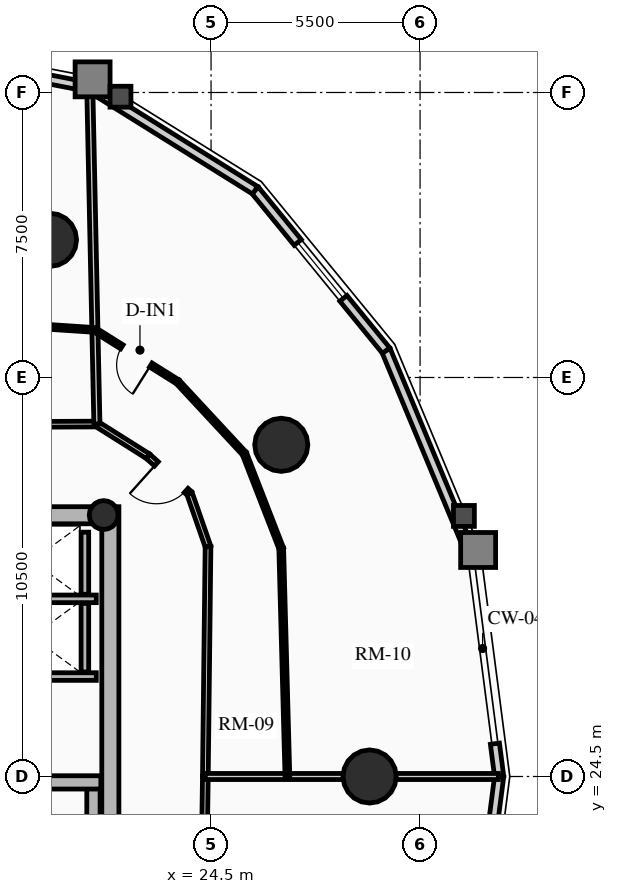
"""IFC4 building model, lengths in metres.
Left out: names, types, materials, properties, quantities, classifications, styles, units other than length and angle.
Written with IfcOpenShell. Run it as: python <this file> out.ifc"""

import sys

from ifc_helpers import new_model, si_unit, direction, frame, frame_2d, origin, origin_2d, place, context, subcontext, project, spatial, rectangle, circle, hollow_circle, extrude, source, transform, mapped, element, fill, save


model = new_model("IFC4")
c1 = context("Model", 3, precision=1e-05, world=origin(), true_north=direction((0.0, 1.0)))
c2 = subcontext(c1, "Body", "Model", "MODEL_VIEW")
j1 = project(units=[si_unit("LENGTHUNIT", "METRE"), si_unit("PLANEANGLEUNIT", "RADIAN")], contexts=[c1])
p1 = place(None, origin())
s1 = spatial("IfcSite", under=j1, at=p1, CompositionType="ELEMENT")
p2 = place(p1, origin())
s2 = spatial("IfcBuilding", under=s1, at=p2, CompositionType="ELEMENT")
p3 = place(p2, frame((0.0, 0.0, 93.43)))
s3 = spatial("IfcBuildingStorey", under=s2, at=p3, CompositionType="ELEMENT", Elevation=93.43)
p4 = place(p3, frame((21.85, 17.4, 0.0), z_axis=(0.0, 0.0, 1.0), x_axis=(0.0, 1.0, 0.0)))
e1 = element("IfcWall", 1, at=p4, inside=s3, PredefinedType="SHEAR", context=c2, shape_type="SweptSolid", body=[
    extrude(rectangle(XDim=14.2, YDim=0.45, at=frame_2d((7.1, 0.0))), origin(), (0.0, 0.0, 1.0), 2.91),
])
p5 = place(p3, frame((11.15, 31.375, 0.0), z_axis=(0.0, 0.0, 1.0), x_axis=(1.0, 0.0, 0.0)))
e2 = element("IfcWall", 2, at=p5, inside=s3, PredefinedType="SHEAR", context=c2, shape_type="SweptSolid", body=[
    extrude(rectangle(XDim=10.7, YDim=0.45, at=frame_2d((5.35, 0.0))), origin(), (0.0, 0.0, 1.0), 2.91),
])
m1 = source(origin(), c2, "Body", "SweptSolid", [
    extrude(rectangle(XDim=1.5, YDim=2.02, at=frame_2d((0.75, 1.01))), frame((0.0, 0.235, 0.0), z_axis=(0.0, -1.0, 0.0), x_axis=(1.0, 0.0, 0.0)), (0.0, 0.0, 1.0), 0.47),
])
p6 = place(p5, frame((4.6, 0.0, 0.0)))
e3 = element("IfcOpeningElement", 3, at=p6, cuts=e2, PredefinedType="OPENING", context=c2, shape_type="MappedRepresentation", body=[
    mapped(m1, transform((0.0, 0.0, 0.0), x_axis=(1.0, 0.0, 0.0), y_axis=(0.0, 1.0, 0.0), z_axis=(0.0, 0.0, 1.0), scale=1.0)),
])
p7 = place(p3, frame((21.405, 17.625, 0.0), z_axis=(0.0, 0.0, 1.0), x_axis=(0.0, 1.0, 0.0)))
e4 = element("IfcWall", 4, at=p7, inside=s3, PredefinedType="SHEAR", context=c2, shape_type="SweptSolid", body=[
    extrude(rectangle(XDim=6.72, YDim=0.35, at=frame_2d((3.36, 0.0))), origin(), (0.0, 0.0, 1.0), 2.91),
])
p8 = place(p3, frame((18.315, 24.345, 0.0), z_axis=(0.0, 0.0, 1.0), x_axis=(1.0, 0.0, 0.0)))
e5 = element("IfcWall", 5, at=p8, inside=s3, PredefinedType="SHEAR", context=c2, shape_type="SweptSolid", body=[
    extrude(rectangle(XDim=3.285, YDim=0.35, at=frame_2d((1.643, 0.0))), origin(), (0.0, 0.0, 1.0), 2.91),
])
p9 = place(p3, frame((21.675, 31.38, 0.0), z_axis=(0.0, 0.0, 1.0), x_axis=(1.0, 0.0, 0.0)))
e6 = element("IfcColumn", 6, at=p9, inside=s3, PredefinedType="COLUMN", context=c2, shape_type="SweptSolid", body=[
    extrude(hollow_circle(Radius=0.38, WallThickness=0.032, at=origin_2d()), origin(), (0.0, 0.0, 1.0), 2.91),
])
for number, where, z_axis, x_axis in (
    (7, (28.672, 24.5, 0.0), (0.0, 0.0, 1.0), (1.0, 0.0, 0.0)),
    (8, (26.347, 33.229, 0.0), (0.0, 0.0, 1.0), (1.0, 0.0, 0.0)),
    (9, (20.261, 38.623, 0.0), (0.0, 0.0, 1.0), (1.0, 0.0, 0.0)),
):
    element("IfcColumn", number, at=place(p3, frame(where, z_axis=z_axis, x_axis=x_axis)), inside=s3, PredefinedType="USERDEFINED", context=c2, shape_type="SweptSolid", body=[
        extrude(circle(Radius=0.7, at=origin_2d()), origin(), (0.0, 0.0, 1.0), 2.91),
    ])
p10 = place(p3, frame((31.969, 25.363, 0.0), z_axis=(0.0, 0.0, 1.0), x_axis=(0.128523364007, -0.991706481225, 0.0)))
e10 = element("IfcWall", 10, at=p10, inside=s3, PredefinedType="SOLIDWALL", context=c2, shape_type="SweptSolid", body=[
    extrude(rectangle(XDim=0.87, YDim=0.24, at=frame_2d((0.435, 0.0))), origin(), (0.0, 0.0, 1.0), 2.655),
])
p11 = place(p3, frame((29.105, 35.709, 0.0), z_axis=(0.0, 0.0, 1.0), x_axis=(0.384344417632, -0.923189779317, 0.0)))
e11 = element("IfcWall", 11, at=p11, inside=s3, PredefinedType="SOLIDWALL", context=c2, shape_type="SweptSolid", body=[
    extrude(rectangle(XDim=5.758, YDim=0.24, at=frame_2d((2.879, 0.0))), origin(), (0.0, 0.0, 1.0), 2.179),
])
p12 = place(p3, frame((25.658, 39.928, 0.0), z_axis=(0.0, 0.0, 1.0), x_axis=(0.632700781152, -0.77439635945, 0.0)))
e12 = element("IfcWall", 12, at=p12, inside=s3, PredefinedType="SOLIDWALL", context=c2, shape_type="SweptSolid", body=[
    extrude(rectangle(XDim=5.448, YDim=0.24, at=frame_2d((2.724, 0.0))), origin(), (0.0, 0.0, 1.0), 2.179),
])
m2 = source(origin(), c2, "Body", "SweptSolid", [
    extrude(rectangle(XDim=1.9, YDim=1.35, at=frame_2d((0.95, 0.675))), frame((0.0, 0.13, 0.0), z_axis=(0.0, -1.0, 0.0), x_axis=(1.0, 0.0, 0.0)), (0.0, 0.0, 1.0), 0.26),
])
p13 = place(p12, frame((1.774, 0.0, 0.65)))
e13 = element("IfcOpeningElement", 13, at=p13, cuts=e12, PredefinedType="OPENING", context=c2, shape_type="MappedRepresentation", body=[
    mapped(m2, transform((0.0, 0.0, 0.0), x_axis=(1.0, 0.0, 0.0), y_axis=(0.0, 1.0, 0.0), z_axis=(0.0, 0.0, 1.0), scale=1.0)),
])
p14 = place(p3, frame((21.315, 42.637, 0.0), z_axis=(0.0, 0.0, 1.0), x_axis=(0.848520380187, -0.529162701263, 0.0)))
e14 = element("IfcWall", 14, at=p14, inside=s3, PredefinedType="SOLIDWALL", context=c2, shape_type="SweptSolid", body=[
    extrude(rectangle(XDim=5.119, YDim=0.24, at=frame_2d((2.56, 0.0))), origin(), (0.0, 0.0, 1.0), 2.179),
])
p15 = place(p3, frame((16.5, 43.57, 0.0), z_axis=(0.0, 0.0, 1.0), x_axis=(0.981723785992, -0.190311344954, 0.0)))
e15 = element("IfcWall", 15, at=p15, inside=s3, PredefinedType="SOLIDWALL", context=c2, shape_type="SweptSolid", body=[
    extrude(rectangle(XDim=4.904, YDim=0.24, at=frame_2d((2.452, 0.0))), origin(), (0.0, 0.0, 1.0), 2.179),
])
m3 = source(origin(), c2, "Body", "SweptSolid", [
    extrude(rectangle(XDim=2.2, YDim=1.35, at=frame_2d((1.1, 0.675))), frame((0.0, 0.13, 0.0), z_axis=(0.0, -1.0, 0.0), x_axis=(1.0, 0.0, 0.0)), (0.0, 0.0, 1.0), 0.26),
])
p16 = place(p15, frame((1.352, 0.0, 0.65)))
e16 = element("IfcOpeningElement", 16, at=p16, cuts=e15, PredefinedType="OPENING", context=c2, shape_type="MappedRepresentation", body=[
    mapped(m3, transform((0.0, 0.0, 0.0), x_axis=(1.0, 0.0, 0.0), y_axis=(0.0, 1.0, 0.0), z_axis=(0.0, 0.0, 1.0), scale=1.0)),
])
p17 = place(p3, frame((32.081, 24.5, 0.0), z_axis=(0.0, 0.0, 1.0), x_axis=(-0.128351991996, -0.991728675672, 0.0)))
e17 = element("IfcWall", 17, at=p17, inside=s3, PredefinedType="SOLIDWALL", context=c2, shape_type="SweptSolid", body=[
    extrude(rectangle(XDim=5.942, YDim=0.24, at=frame_2d((2.971, 0.0))), origin(), (0.0, 0.0, 1.0), 2.179),
])
p18 = place(p17, frame((1.871, 0.0, 0.65)))
e18 = element("IfcOpeningElement", 18, at=p18, cuts=e17, PredefinedType="OPENING", context=c2, shape_type="MappedRepresentation", body=[
    mapped(m3, transform((0.0, 0.0, 0.0), x_axis=(1.0, 0.0, 0.0), y_axis=(0.0, 1.0, 0.0), z_axis=(0.0, 0.0, 1.0), scale=1.0)),
])
for number, where, z_axis, x_axis in (
    (19, (18.51, 27.13, 0.0), (0.0, 0.0, 1.0), (1.0, 0.0, 0.0)),
    (20, (18.51, 29.175, 0.0), (0.0, 0.0, 1.0), (1.0, 0.0, 0.0)),
):
    element("IfcWall", number, at=place(p3, frame(where, z_axis=z_axis, x_axis=x_axis)), inside=s3, PredefinedType="SHEAR", context=c2, shape_type="SweptSolid", body=[
        extrude(rectangle(XDim=2.97, YDim=0.2, at=frame_2d((1.485, 0.0))), origin(), (0.0, 0.0, 1.0), 2.91),
    ])
p19 = place(p3, frame((21.18, 27.25, 0.0), z_axis=(0.0, 0.0, 1.0), x_axis=(0.0, 1.0, 0.0)))
e21 = element("IfcWall", 21, at=p19, inside=s3, PredefinedType="SHEAR", context=c2, shape_type="SweptSolid", body=[
    extrude(rectangle(XDim=1.805, YDim=0.2, at=frame_2d((0.902, 0.0))), origin(), (0.0, 0.0, 1.0), 2.91),
])
p20 = place(p3, frame((21.18, 29.295, 0.0), z_axis=(0.0, 0.0, 1.0), x_axis=(0.0, 1.0, 0.0)))
e22 = element("IfcWall", 22, at=p20, inside=s3, PredefinedType="SHEAR", context=c2, shape_type="SweptSolid", body=[
    extrude(rectangle(XDim=1.635, YDim=0.2, at=frame_2d((0.817, 0.0))), origin(), (0.0, 0.0, 1.0), 2.91),
])
p21 = place(p3, frame((24.35, 24.5, 0.0), z_axis=(0.0, 0.0, 1.0), x_axis=(0.011582078845, 0.999932925475, 0.0)))
e23 = element("IfcWall", 23, at=p21, inside=s3, PredefinedType="PARTITIONING", context=c2, shape_type="SweptSolid", body=[
    extrude(rectangle(XDim=6.05, YDim=0.15, at=frame_2d((3.025, 0.0))), origin(), (0.0, 0.0, 1.0), 2.225),
])
p22 = place(p3, frame((24.42, 30.549, 0.0), z_axis=(0.0, 0.0, 1.0), x_axis=(-0.329071042252, 0.944305167386, 0.0)))
e24 = element("IfcWall", 24, at=p22, inside=s3, PredefinedType="PARTITIONING", context=c2, shape_type="SweptSolid", body=[
    extrude(rectangle(XDim=1.479, YDim=0.15, at=frame_2d((0.74, 0.0))), origin(), (0.0, 0.0, 1.0), 2.225),
])
p23 = place(p3, frame((23.933, 31.946, 0.0), z_axis=(0.0, 0.0, 1.0), x_axis=(-0.744529651383, 0.667589393423, 0.0)))
e25 = element("IfcWall", 25, at=p23, inside=s3, PredefinedType="PARTITIONING", context=c2, shape_type="SweptSolid", body=[
    extrude(rectangle(XDim=1.472, YDim=0.15, at=frame_2d((0.736, 0.0))), origin(), (0.0, 0.0, 1.0), 2.225),
])
m4 = source(origin(), c2, "Body", "SweptSolid", [
    extrude(rectangle(XDim=1.05, YDim=2.015, at=frame_2d((0.525, 1.007))), frame((0.0, 0.085, 0.0), z_axis=(0.0, -1.0, 0.0), x_axis=(1.0, 0.0, 0.0)), (0.0, 0.0, 1.0), 0.17),
])
p24 = place(p23, frame((0.12, 0.0, 0.0)))
e26 = element("IfcOpeningElement", 26, at=p24, cuts=e25, PredefinedType="OPENING", context=c2, shape_type="MappedRepresentation", body=[
    mapped(m4, transform((0.0, 0.0, 0.0), x_axis=(1.0, 0.0, 0.0), y_axis=(0.0, 1.0, 0.0), z_axis=(0.0, 0.0, 1.0), scale=1.0)),
])
p25 = place(p3, frame((22.837, 32.929, 0.0), z_axis=(0.0, 0.0, 1.0), x_axis=(-0.84581079329, 0.533482991252, 0.0)))
e27 = element("IfcWall", 27, at=p25, inside=s3, PredefinedType="PARTITIONING", context=c2, shape_type="SweptSolid", body=[
    extrude(rectangle(XDim=1.585, YDim=0.15, at=frame_2d((0.792, 0.0))), origin(), (0.0, 0.0, 1.0), 2.225),
])
p26 = place(p3, frame((21.496, 33.775, 0.0), z_axis=(0.0, 0.0, 1.0), x_axis=(-0.999989544737, -0.004572790979, 0.0)))
e28 = element("IfcWall", 28, at=p26, inside=s3, PredefinedType="PARTITIONING", context=c2, shape_type="SweptSolid", body=[
    extrude(rectangle(XDim=3.364, YDim=0.15, at=frame_2d((1.682, 0.0))), origin(), (0.0, 0.0, 1.0), 2.225),
])
p27 = place(p3, frame((24.264, 18.561, 0.0), z_axis=(0.0, 0.0, 1.0), x_axis=(0.014427504204, 0.999895918145, 0.0)))
e29 = element("IfcWall", 29, at=p27, inside=s3, PredefinedType="PARTITIONING", context=c2, shape_type="SweptSolid", body=[
    extrude(rectangle(XDim=5.94, YDim=0.15, at=frame_2d((2.97, 0.0))), origin(), (0.0, 0.0, 1.0), 2.655),
])
m5 = source(origin(), c2, "Body", "SweptSolid", [
    extrude(rectangle(XDim=1.0, YDim=2.015, at=frame_2d((0.5, 1.007))), frame((0.0, 0.085, 0.0), z_axis=(0.0, -1.0, 0.0), x_axis=(1.0, 0.0, 0.0)), (0.0, 0.0, 1.0), 0.17),
])
p28 = place(p27, frame((2.47, 0.0, 0.0)))
e30 = element("IfcOpeningElement", 30, at=p28, cuts=e29, PredefinedType="OPENING", context=c2, shape_type="MappedRepresentation", body=[
    mapped(m5, transform((0.0, 0.0, 0.0), x_axis=(1.0, 0.0, 0.0), y_axis=(0.0, 1.0, 0.0), z_axis=(0.0, 0.0, 1.0), scale=1.0)),
])
p29 = place(p3, frame((24.35, 24.5, 0.0), z_axis=(0.0, 0.0, 1.0), x_axis=(1.0, 0.0, 0.0)))
e31 = element("IfcWall", 31, at=p29, inside=s3, PredefinedType="PARTITIONING", context=c2, shape_type="SweptSolid", body=[
    extrude(rectangle(XDim=7.711, YDim=0.16, at=frame_2d((3.855, 0.0))), origin(), (0.0, 0.0, 1.0), 2.179),
])
p30 = place(p3, frame((21.496, 33.775, 0.0), z_axis=(0.0, 0.0, 1.0), x_axis=(-0.021226580265, 0.999774690763, 0.0)))
e32 = element("IfcWall", 32, at=p30, inside=s3, PredefinedType="PARTITIONING", context=c2, shape_type="SweptSolid", body=[
    extrude(rectangle(XDim=8.845, YDim=0.16, at=frame_2d((4.422, 0.0))), origin(), (0.0, 0.0, 1.0), 2.179),
])
p31 = place(p3, frame((26.509, 24.5, 0.0), z_axis=(0.0, 0.0, 1.0), x_axis=(-0.027112670792, 0.99963238397, 0.0)))
e33 = element("IfcWall", 33, at=p31, inside=s3, PredefinedType="PARTITIONING", context=c2, shape_type="SweptSolid", body=[
    extrude(rectangle(XDim=6.006, YDim=0.125, at=frame_2d((3.003, 0.0))), origin(), (0.0, 0.0, 1.0), 2.225),
])
p32 = place(p3, frame((26.346, 30.504, 0.0), z_axis=(0.0, 0.0, 1.0), x_axis=(-0.362402208915, 0.932021801769, 0.0)))
e34 = element("IfcWall", 34, at=p32, inside=s3, PredefinedType="PARTITIONING", context=c2, shape_type="SweptSolid", body=[
    extrude(rectangle(XDim=2.675, YDim=0.125, at=frame_2d((1.337, 0.0))), origin(), (0.0, 0.0, 1.0), 2.225),
])
p33 = place(p3, frame((25.377, 32.997, 0.0), z_axis=(0.0, 0.0, 1.0), x_axis=(-0.680516524321, 0.732732734445, 0.0)))
e35 = element("IfcWall", 35, at=p33, inside=s3, PredefinedType="PARTITIONING", context=c2, shape_type="SweptSolid", body=[
    extrude(rectangle(XDim=2.576, YDim=0.125, at=frame_2d((1.288, 0.0))), origin(), (0.0, 0.0, 1.0), 2.655),
])
p34 = place(p3, frame((23.624, 34.884, 0.0), z_axis=(0.0, 0.0, 1.0), x_axis=(-0.84728326465, 0.531141289531, 0.0)))
e36 = element("IfcWall", 36, at=p34, inside=s3, PredefinedType="PARTITIONING", context=c2, shape_type="SweptSolid", body=[
    extrude(rectangle(XDim=2.573, YDim=0.125, at=frame_2d((1.287, 0.0))), origin(), (0.0, 0.0, 1.0), 2.225),
])
m6 = source(origin(), c2, "Body", "SweptSolid", [
    extrude(rectangle(XDim=0.9, YDim=2.005, at=frame_2d((0.45, 1.002))), frame((0.0, 0.073, 0.0), z_axis=(0.0, -1.0, 0.0), x_axis=(1.0, 0.0, 0.0)), (0.0, 0.0, 1.0), 0.145),
])
p35 = place(p34, frame((0.836, 0.0, 0.0)))
e37 = element("IfcOpeningElement", 37, at=p35, cuts=e36, PredefinedType="OPENING", context=c2, shape_type="MappedRepresentation", body=[
    mapped(m6, transform((0.0, 0.0, 0.0), x_axis=(1.0, 0.0, 0.0), y_axis=(0.0, 1.0, 0.0), z_axis=(0.0, 0.0, 1.0), scale=1.0)),
])
p36 = place(p3, frame((21.444, 36.251, 0.0), z_axis=(0.0, 0.0, 1.0), x_axis=(-0.997810544349, 0.066137112017, 0.0)))
e38 = element("IfcWall", 38, at=p36, inside=s3, PredefinedType="PARTITIONING", context=c2, shape_type="SweptSolid", body=[
    extrude(rectangle(XDim=3.776, YDim=0.125, at=frame_2d((1.888, 0.0))), origin(), (0.0, 0.0, 1.0), 2.225),
])
m7 = source(origin(), c2, "Body", "SweptSolid", [
    extrude(rectangle(XDim=1.9, YDim=1.35, at=frame_2d((0.95, 0.675))), frame((0.0, 0.03, 0.0), z_axis=(0.0, -1.0, 0.0), x_axis=(1.0, 0.0, 0.0)), (0.0, 0.0, 1.0), 0.06),
])
p37 = place(p13, origin())
e39 = element("IfcWindow", 39, at=p37, inside=s3, PartitioningType="DOUBLE_PANEL_VERTICAL", PredefinedType="WINDOW", context=c2, shape_type="MappedRepresentation", body=[
    mapped(m7, transform((0.0, 0.0, 0.0), x_axis=(1.0, 0.0, 0.0), y_axis=(0.0, 1.0, 0.0), z_axis=(0.0, 0.0, 1.0), scale=1.0)),
])
fill(e13, e39)
m8 = source(origin(), c2, "Body", "SweptSolid", [
    extrude(rectangle(XDim=1.05, YDim=2.015, at=frame_2d((0.525, 1.007))), frame((0.0, 0.025, 0.0), z_axis=(0.0, -1.0, 0.0), x_axis=(1.0, 0.0, 0.0)), (0.0, 0.0, 1.0), 0.05),
])
p38 = place(p24, origin())
e40 = element("IfcDoor", 40, at=p38, inside=s3, OperationType="SINGLE_SWING_RIGHT", PredefinedType="DOOR", context=c2, shape_type="MappedRepresentation", body=[
    mapped(m8, transform((0.0, 0.0, 0.0), x_axis=(1.0, 0.0, 0.0), y_axis=(0.0, 1.0, 0.0), z_axis=(0.0, 0.0, 1.0), scale=1.0)),
])
fill(e26, e40)
m9 = source(origin(), c2, "Body", "SweptSolid", [
    extrude(rectangle(XDim=0.9, YDim=2.005, at=frame_2d((0.45, 1.002))), frame((0.0, 0.025, 0.0), z_axis=(0.0, -1.0, 0.0), x_axis=(1.0, 0.0, 0.0)), (0.0, 0.0, 1.0), 0.05),
])
p39 = place(p35, origin())
e41 = element("IfcDoor", 41, at=p39, inside=s3, OperationType="SINGLE_SWING_LEFT", PredefinedType="DOOR", context=c2, shape_type="MappedRepresentation", body=[
    mapped(m9, transform((0.0, 0.0, 0.0), x_axis=(1.0, 0.0, 0.0), y_axis=(0.0, 1.0, 0.0), z_axis=(0.0, 0.0, 1.0), scale=1.0)),
])
fill(e37, e41)
save(model, sys.argv[1])
